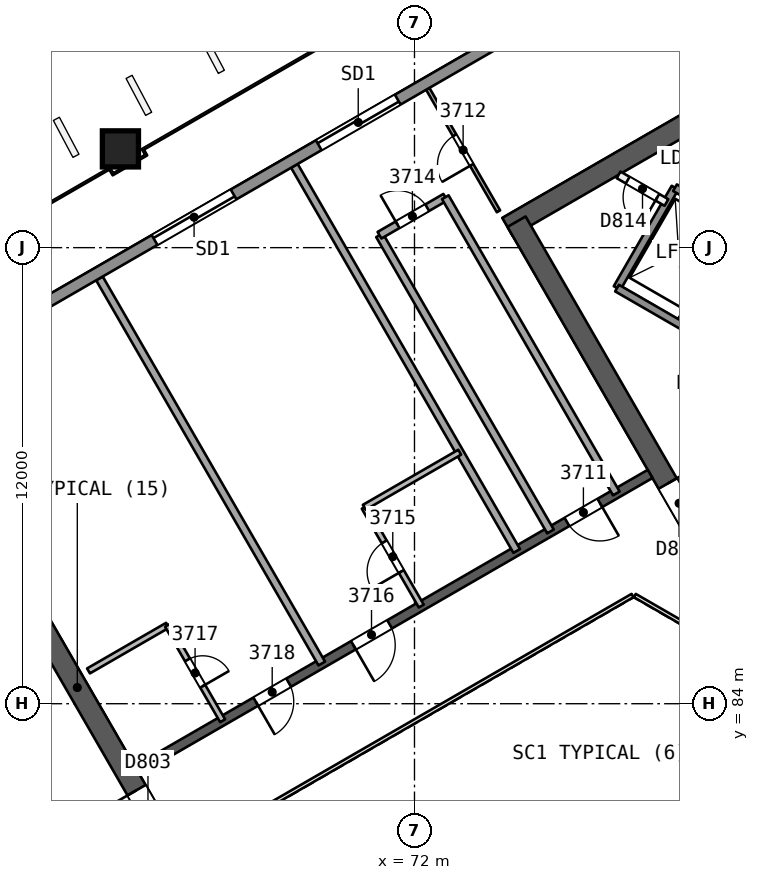
"""IFC4 building model, lengths in metres.
Left out: names, types, materials, properties, quantities, classifications, styles, units other than length and angle.
Written with IfcOpenShell. Run it as: python <this file> out.ifc"""

import sys

from ifc_helpers import new_model, si_unit, direction, frame, frame_2d, origin, origin_2d, place, context, subcontext, project, spatial, rectangle, extrude, element, fill, save


model = new_model("IFC4")
c1 = context("Model", 3, precision=1e-05, world=origin(), true_north=direction((0.0, 1.0)))
c2 = subcontext(c1, "Body", "Model", "MODEL_VIEW")
j1 = project(units=[si_unit("LENGTHUNIT", "METRE"), si_unit("PLANEANGLEUNIT", "RADIAN")], contexts=[c1])
p1 = place(None, origin())
s1 = spatial("IfcSite", under=j1, at=p1, CompositionType="ELEMENT")
p2 = place(p1, origin())
s2 = spatial("IfcBuilding", under=s1, at=p2, CompositionType="ELEMENT")
p3 = place(p2, frame((0.0, 0.0, 156.3)))
s3 = spatial("IfcBuildingStorey", under=s2, at=p3, CompositionType="ELEMENT", Elevation=156.3)
p4 = place(p3, frame((65.682, 80.0, 0.0), z_axis=(0.0, 0.0, 1.0), x_axis=(-0.500000202252, 0.866025287014, 0.0)))
e1 = element("IfcWall", 1, at=p4, inside=s3, PredefinedType="SHEAR", context=c2, shape_type="SweptSolid", body=[
    extrude(rectangle(XDim=10.221, YDim=0.55, at=frame_2d((5.111, 0.0))), origin(), (0.0, 0.0, 1.0), 3.7),
])
p5 = place(p4, frame((0.791, 0.0, 0.0)))
e2 = element("IfcOpeningElement", 2, at=p5, cuts=e1, PredefinedType="OPENING", context=c2, shape_type="SweptSolid", body=[
    extrude(rectangle(XDim=1.2, YDim=2.1, at=frame_2d((0.6, 1.05))), frame((0.0, 0.286, 0.0), z_axis=(0.0, -1.0, 0.0), x_axis=(1.0, 0.0, 0.0)), (0.0, 0.0, 1.0), 0.571),
])
p6 = place(p3, frame((86.723, 103.633, 0.0), z_axis=(0.0, 0.0, 1.0), x_axis=(-0.866023530946, -0.500003243837, 0.0)))
e3 = element("IfcWall", 3, at=p6, inside=s3, PredefinedType="SHEAR", context=c2, shape_type="SweptSolid", body=[
    extrude(rectangle(XDim=14.175, YDim=0.55, at=frame_2d((7.087, 0.0))), origin(), (0.0, 0.0, 1.0), 3.7),
])
p7 = place(p3, frame((74.686, 96.683, 0.0), z_axis=(0.0, 0.0, 1.0), x_axis=(0.499997818338, -0.866026663364, 0.0)))
e4 = element("IfcWall", 4, at=p7, inside=s3, PredefinedType="SHEAR", context=c2, shape_type="SweptSolid", body=[
    extrude(rectangle(XDim=10.105, YDim=0.55, at=frame_2d((5.052, 0.0))), origin(), (0.0, 0.0, 1.0), 3.7),
])
p8 = place(p7, frame((7.955, 0.0, 0.0)))
e5 = element("IfcOpeningElement", 5, at=p8, cuts=e4, PredefinedType="OPENING", context=c2, shape_type="SweptSolid", body=[
    extrude(rectangle(XDim=1.2, YDim=2.1, at=frame_2d((0.6, 1.05))), frame((0.0, 0.286, 0.0), z_axis=(0.0, -1.0, 0.0), x_axis=(1.0, 0.0, 0.0)), (0.0, 0.0, 1.0), 0.571),
])
p9 = place(p3, frame((78.2, 90.046, 0.0), z_axis=(0.0, 0.0, 1.0), x_axis=(-0.866026492143, -0.499998114903, 0.0)))
e6 = element("IfcWall", 6, at=p9, inside=s3, PredefinedType="SHEAR", context=c2, shape_type="SweptSolid", body=[
    extrude(rectangle(XDim=15.588, YDim=0.25, at=frame_2d((7.794, 0.0))), origin(), (0.0, 0.0, 1.0), 3.25),
])
p10 = place(p9, frame((1.527, 0.0, 0.0)))
e7 = element("IfcOpeningElement", 7, at=p10, cuts=e6, PredefinedType="OPENING", context=c2, shape_type="SweptSolid", body=[
    extrude(rectangle(XDim=1.0, YDim=2.1, at=frame_2d((0.5, 1.05))), frame((0.0, 0.135, 0.0), z_axis=(0.0, -1.0, 0.0), x_axis=(1.0, 0.0, 0.0)), (0.0, 0.0, 1.0), 0.271),
])
p11 = place(p9, frame((7.915, 0.0, 0.0)))
e8 = element("IfcOpeningElement", 8, at=p11, cuts=e6, PredefinedType="OPENING", context=c2, shape_type="SweptSolid", body=[
    extrude(rectangle(XDim=1.1, YDim=2.1, at=frame_2d((0.55, 1.05))), frame((0.0, 0.135, 0.0), z_axis=(0.0, -1.0, 0.0), x_axis=(1.0, 0.0, 0.0)), (0.0, 0.0, 1.0), 0.271),
])
p12 = place(p9, frame((10.982, 0.0, 0.0)))
e9 = element("IfcOpeningElement", 9, at=p12, cuts=e6, PredefinedType="OPENING", context=c2, shape_type="SweptSolid", body=[
    extrude(rectangle(XDim=1.0, YDim=2.1, at=frame_2d((0.5, 1.05))), frame((0.0, 0.135, 0.0), z_axis=(0.0, -1.0, 0.0), x_axis=(1.0, 0.0, 0.0)), (0.0, 0.0, 1.0), 0.271),
])
p13 = place(p3, frame((64.25, 98.62, 0.0), z_axis=(0.010093620709, -0.017482414954, 0.999796221231), x_axis=(-0.499897086036, 0.865849517735, 0.020187025824)))
e10 = element("IfcColumn", 10, at=p13, inside=s3, PredefinedType="COLUMN", context=c2, shape_type="SweptSolid", body=[
    extrude(rectangle(XDim=0.95, YDim=0.95, at=origin_2d()), origin(), (0.0, 0.0, 1.0), 3.701),
])
p14 = place(p3, frame((74.21, 96.956, 0.0), z_axis=(0.0, 0.0, 1.0), x_axis=(-0.499983621345, 0.866034859799, 0.0)))
e11 = element("IfcWall", 11, at=p14, inside=s3, PredefinedType="PARTITIONING", context=c2, shape_type="SweptSolid", body=[
    extrude(rectangle(XDim=3.722, YDim=0.1, at=frame_2d((1.861, 0.0))), origin(), (0.0, 0.0, 1.0), 3.25),
])
p15 = place(p14, frame((1.411, 0.0, 0.0)))
e12 = element("IfcOpeningElement", 12, at=p15, cuts=e11, PredefinedType="OPENING", context=c2, shape_type="SweptSolid", body=[
    extrude(rectangle(XDim=0.9, YDim=2.1, at=frame_2d((0.45, 1.05))), frame((0.0, 0.061, 0.0), z_axis=(0.0, -1.0, 0.0), x_axis=(1.0, 0.0, 0.0)), (0.0, 0.0, 1.0), 0.121),
])
p16 = place(p3, frame((75.579, 88.533, 0.0), z_axis=(0.0, 0.0, 1.0), x_axis=(-0.5000018851, 0.866024315419, 0.0)))
e13 = element("IfcWall", 13, at=p16, inside=s3, PredefinedType="PARTITIONING", context=c2, shape_type="SweptSolid", body=[
    extrude(rectangle(XDim=9.0, YDim=0.2, at=frame_2d((4.5, 0.0))), origin(), (0.0, 0.0, 1.0), 3.25),
])
p17 = place(p3, frame((71.079, 96.327, 0.0), z_axis=(0.0, 0.0, 1.0), x_axis=(0.866041268327, 0.499972520799, 0.0)))
e14 = element("IfcWall", 14, at=p17, inside=s3, PredefinedType="PARTITIONING", context=c2, shape_type="SweptSolid", body=[
    extrude(rectangle(XDim=2.0, YDim=0.2, at=frame_2d((1.0, 0.0))), origin(), (0.0, 0.0, 1.0), 3.25),
])
p18 = place(p17, frame((0.55, 0.0, 0.0)))
e15 = element("IfcOpeningElement", 15, at=p18, cuts=e14, PredefinedType="OPENING", context=c2, shape_type="SweptSolid", body=[
    extrude(rectangle(XDim=0.9, YDim=2.1, at=frame_2d((0.45, 1.05))), frame((0.0, 0.11, 0.0), z_axis=(0.0, -1.0, 0.0), x_axis=(1.0, 0.0, 0.0)), (0.0, 0.0, 1.0), 0.221),
])
p19 = place(p3, frame((72.811, 97.327, 0.0), z_axis=(0.0, 0.0, 1.0), x_axis=(0.5000018851, -0.866024315419, 0.0)))
e16 = element("IfcWall", 16, at=p19, inside=s3, PredefinedType="PARTITIONING", context=c2, shape_type="SweptSolid", body=[
    extrude(rectangle(XDim=9.0, YDim=0.2, at=frame_2d((4.5, 0.0))), origin(), (0.0, 0.0, 1.0), 3.25),
])
p20 = place(p3, frame((68.839, 98.153, 0.0), z_axis=(0.0, 0.0, 1.0), x_axis=(0.499998785317, -0.866026105081, 0.0)))
e17 = element("IfcWall", 17, at=p20, inside=s3, PredefinedType="PARTITIONING", context=c2, shape_type="SweptSolid", body=[
    extrude(rectangle(XDim=11.701, YDim=0.2, at=frame_2d((5.851, 0.0))), origin(), (0.0, 0.0, 1.0), 3.25),
])
p21 = place(p3, frame((72.178, 86.569, 0.0), z_axis=(0.0, 0.0, 1.0), x_axis=(-0.499990139034, 0.866031096941, 0.0)))
e18 = element("IfcWall", 18, at=p21, inside=s3, PredefinedType="PARTITIONING", context=c2, shape_type="SweptSolid", body=[
    extrude(rectangle(XDim=3.0, YDim=0.15, at=frame_2d((1.5, 0.0))), origin(), (0.0, 0.0, 1.0), 3.25),
])
p22 = place(p21, frame((1.05, 0.0, 0.0)))
e19 = element("IfcOpeningElement", 19, at=p22, cuts=e18, PredefinedType="OPENING", context=c2, shape_type="SweptSolid", body=[
    extrude(rectangle(XDim=0.9, YDim=2.1, at=frame_2d((0.45, 1.05))), frame((0.0, 0.085, 0.0), z_axis=(0.0, -1.0, 0.0), x_axis=(1.0, 0.0, 0.0)), (0.0, 0.0, 1.0), 0.171),
])
p23 = place(p3, frame((70.678, 89.167, 0.0), z_axis=(0.0, 0.0, 1.0), x_axis=(0.866032775405, 0.499987231761, 0.0)))
e20 = element("IfcWall", 20, at=p23, inside=s3, PredefinedType="PARTITIONING", context=c2, shape_type="SweptSolid", body=[
    extrude(rectangle(XDim=2.9, YDim=0.15, at=frame_2d((1.45, 0.0))), origin(), (0.0, 0.0, 1.0), 3.25),
])
p24 = place(p3, frame((63.709, 95.191, 0.0), z_axis=(0.0, 0.0, 1.0), x_axis=(0.499998785317, -0.866026105081, 0.0)))
e21 = element("IfcWall", 21, at=p24, inside=s3, PredefinedType="PARTITIONING", context=c2, shape_type="SweptSolid", body=[
    extrude(rectangle(XDim=11.701, YDim=0.2, at=frame_2d((5.851, 0.0))), origin(), (0.0, 0.0, 1.0), 3.25),
])
p25 = place(p3, frame((63.422, 84.863, 0.0), z_axis=(0.0, 0.0, 1.0), x_axis=(0.865994240961, 0.500053971709, 0.0)))
e22 = element("IfcWall", 22, at=p25, inside=s3, PredefinedType="PARTITIONING", context=c2, shape_type="SweptSolid", body=[
    extrude(rectangle(XDim=2.401, YDim=0.15, at=frame_2d((1.201, 0.0))), origin(), (0.0, 0.0, 1.0), 3.25),
])
p26 = place(p3, frame((65.502, 86.063, 0.0), z_axis=(0.0, 0.0, 1.0), x_axis=(0.499987231761, -0.866032775405, 0.0)))
e23 = element("IfcWall", 23, at=p26, inside=s3, PredefinedType="PARTITIONING", context=c2, shape_type="SweptSolid", body=[
    extrude(rectangle(XDim=2.9, YDim=0.15, at=frame_2d((1.45, 0.0))), origin(), (0.0, 0.0, 1.0), 3.25),
])
p27 = place(p26, frame((1.05, 0.0, 0.0)))
e24 = element("IfcOpeningElement", 24, at=p27, cuts=e23, PredefinedType="OPENING", context=c2, shape_type="SweptSolid", body=[
    extrude(rectangle(XDim=0.8, YDim=2.1, at=frame_2d((0.4, 1.05))), frame((0.0, 0.085, 0.0), z_axis=(0.0, -1.0, 0.0), x_axis=(1.0, 0.0, 0.0)), (0.0, 0.0, 1.0), 0.171),
])
p28 = place(p3, frame((41.928, 82.788, 0.0), z_axis=(0.0, 0.0, 1.0), x_axis=(0.866025629663, 0.499999608766, 0.0)))
e25 = element("IfcWall", 25, at=p28, inside=s3, PredefinedType="SOLIDWALL", context=c2, shape_type="SweptSolid", body=[
    extrude(rectangle(XDim=54.494, YDim=0.3, at=frame_2d((27.247, 0.0))), origin(), (0.0, 0.0, 1.0), 3.25),
])
p29 = place(p28, frame((26.826, 0.0, 0.0)))
e26 = element("IfcOpeningElement", 26, at=p29, cuts=e25, PredefinedType="OPENING", context=c2, shape_type="SweptSolid", body=[
    extrude(rectangle(XDim=2.4, YDim=2.4, at=frame_2d((1.2, 1.2))), frame((0.0, 0.161, 0.0), z_axis=(0.0, -1.0, 0.0), x_axis=(1.0, 0.0, 0.0)), (0.0, 0.0, 1.0), 0.321),
])
p30 = place(p28, frame((31.815, 0.0, 0.0)))
e27 = element("IfcOpeningElement", 27, at=p30, cuts=e25, PredefinedType="OPENING", context=c2, shape_type="SweptSolid", body=[
    extrude(rectangle(XDim=2.4, YDim=2.4, at=frame_2d((1.2, 1.2))), frame((0.0, 0.161, 0.0), z_axis=(0.0, -1.0, 0.0), x_axis=(1.0, 0.0, 0.0)), (0.0, 0.0, 1.0), 0.321),
])
p31 = place(p28, frame((42.339, 0.0, 0.0)))
e28 = element("IfcOpeningElement", 28, at=p31, cuts=e25, PredefinedType="OPENING", context=c2, shape_type="SweptSolid", body=[
    extrude(rectangle(XDim=2.4, YDim=2.4, at=frame_2d((1.2, 1.2))), frame((0.0, 0.161, 0.0), z_axis=(0.0, -1.0, 0.0), x_axis=(1.0, 0.0, 0.0)), (0.0, 0.0, 1.0), 0.321),
])
p32 = place(p28, frame((11.289, 0.0, 0.0)))
e29 = element("IfcOpeningElement", 29, at=p32, cuts=e25, PredefinedType="OPENING", context=c2, shape_type="SweptSolid", body=[
    extrude(rectangle(XDim=2.4, YDim=2.4, at=frame_2d((1.2, 1.2))), frame((0.0, 0.161, 0.0), z_axis=(0.0, -1.0, 0.0), x_axis=(1.0, 0.0, 0.0)), (0.0, 0.0, 1.0), 0.321),
])
for number, where, z_axis, x_axis in (
    (30, (78.976, 93.986, 0.0), (0.0, 0.0, 1.0), (0.5, 0.866, 0.0)),
    (31, (77.33, 94.936, 0.0), (0.0, 0.0, 1.0), (0.5, 0.866, 0.0)),
):
    element("IfcWall", number, at=place(p3, frame(where, z_axis=z_axis, x_axis=x_axis)), inside=s3, PredefinedType="SOLIDWALL", context=c2, shape_type="SweptSolid", body=[
        extrude(rectangle(XDim=3.05, YDim=0.2, at=frame_2d((1.525, 0.0))), origin(), (0.0, 0.0, 1.0), 3.25),
    ])
p33 = place(p3, frame((86.77, 89.486, 0.0), z_axis=(0.0, 0.0, 1.0), x_axis=(-0.86601811187, 0.500012629753, 0.0)))
e32 = element("IfcWall", 32, at=p33, inside=s3, PredefinedType="SOLIDWALL", context=c2, shape_type="SweptSolid", body=[
    extrude(rectangle(XDim=10.9, YDim=0.2, at=frame_2d((5.45, 0.0))), origin(), (0.0, 0.0, 1.0), 3.25),
])
p34 = place(p33, frame((0.575, 0.0, 0.0)))
e33 = element("IfcOpeningElement", 33, at=p34, cuts=e32, PredefinedType="OPENING", context=c2, shape_type="SweptSolid", body=[
    extrude(rectangle(XDim=1.1, YDim=2.1, at=frame_2d((0.55, 1.05))), frame((0.0, 0.11, 0.0), z_axis=(0.0, -1.0, 0.0), x_axis=(1.0, 0.0, 0.0)), (0.0, 0.0, 1.0), 0.221),
])
p35 = place(p33, frame((2.825, 0.0, 0.0)))
e34 = element("IfcOpeningElement", 34, at=p35, cuts=e32, PredefinedType="OPENING", context=c2, shape_type="SweptSolid", body=[
    extrude(rectangle(XDim=1.1, YDim=2.1, at=frame_2d((0.55, 1.05))), frame((0.0, 0.11, 0.0), z_axis=(0.0, -1.0, 0.0), x_axis=(1.0, 0.0, 0.0)), (0.0, 0.0, 1.0), 0.221),
])
p36 = place(p33, frame((5.075, 0.0, 0.0)))
e35 = element("IfcOpeningElement", 35, at=p36, cuts=e32, PredefinedType="OPENING", context=c2, shape_type="SweptSolid", body=[
    extrude(rectangle(XDim=1.1, YDim=2.1, at=frame_2d((0.55, 1.05))), frame((0.0, 0.11, 0.0), z_axis=(0.0, -1.0, 0.0), x_axis=(1.0, 0.0, 0.0)), (0.0, 0.0, 1.0), 0.221),
])
p37 = place(p33, frame((7.325, 0.0, 0.0)))
e36 = element("IfcOpeningElement", 36, at=p37, cuts=e32, PredefinedType="OPENING", context=c2, shape_type="SweptSolid", body=[
    extrude(rectangle(XDim=1.1, YDim=2.1, at=frame_2d((0.55, 1.05))), frame((0.0, 0.11, 0.0), z_axis=(0.0, -1.0, 0.0), x_axis=(1.0, 0.0, 0.0)), (0.0, 0.0, 1.0), 0.221),
])
p38 = place(p3, frame((78.63, 97.188, 0.0), z_axis=(0.0, 0.0, 1.0), x_axis=(-0.866003949776, 0.500037157592, 0.0)))
e37 = element("IfcWall", 37, at=p38, inside=s3, PredefinedType="PARTITIONING", context=c2, shape_type="SweptSolid", body=[
    extrude(rectangle(XDim=1.455, YDim=0.2, at=frame_2d((0.728, 0.0))), origin(), (0.0, 0.0, 1.0), 3.25),
])
p39 = place(p38, frame((0.278, 0.0, 0.0)))
e38 = element("IfcOpeningElement", 38, at=p39, cuts=e37, PredefinedType="OPENING", context=c2, shape_type="SweptSolid", body=[
    extrude(rectangle(XDim=0.9, YDim=2.1, at=frame_2d((0.45, 1.05))), frame((0.0, 0.11, 0.0), z_axis=(0.0, -1.0, 0.0), x_axis=(1.0, 0.0, 0.0)), (0.0, 0.0, 1.0), 0.221),
])
p40 = place(p3, frame((80.5, 96.627, 0.0), z_axis=(0.0, 0.0, 1.0), x_axis=(-0.86601224135, 0.500022797313, 0.0)))
e39 = element("IfcWall", 39, at=p40, inside=s3, PredefinedType="SOLIDWALL", context=c2, shape_type="SweptSolid", body=[
    extrude(rectangle(XDim=1.9, YDim=0.2, at=frame_2d((0.95, 0.0))), origin(), (0.0, 0.0, 1.0), 3.25),
])
p41 = place(p40, frame((0.4, 0.0, 0.0)))
e40 = element("IfcOpeningElement", 40, at=p41, cuts=e39, PredefinedType="OPENING", context=c2, shape_type="SweptSolid", body=[
    extrude(rectangle(XDim=1.1, YDim=2.1, at=frame_2d((0.55, 1.05))), frame((0.0, 0.11, 0.0), z_axis=(0.0, -1.0, 0.0), x_axis=(1.0, 0.0, 0.0)), (0.0, 0.0, 1.0), 0.221),
])
p42 = place(p3, frame((79.53, 85.846, 0.0), z_axis=(0.0, 0.0, 1.0), x_axis=(-0.866041268327, 0.499972520799, 0.0)))
e41 = element("IfcWall", 41, at=p42, inside=s3, PredefinedType="PARTITIONING", context=c2, shape_type="SweptSolid", body=[
    extrude(rectangle(XDim=2.0, YDim=0.1, at=frame_2d((1.0, 0.0))), origin(), (0.0, 0.0, 1.0), 3.25),
])
p43 = place(p3, frame((77.738, 86.846, 0.0), z_axis=(0.0, 0.0, 1.0), x_axis=(-0.866026658274, -0.499997827154, 0.0)))
e42 = element("IfcWall", 42, at=p43, inside=s3, PredefinedType="PARTITIONING", context=c2, shape_type="SweptSolid", body=[
    extrude(rectangle(XDim=11.588, YDim=0.1, at=frame_2d((5.794, 0.0))), origin(), (0.0, 0.0, 1.0), 3.25),
])
p44 = place(p10, origin())
e43 = element("IfcDoor", 43, at=p44, inside=s3, OperationType="SINGLE_SWING_LEFT", PredefinedType="NOTDEFINED", context=c2, shape_type="SweptSolid", body=[
    extrude(rectangle(XDim=1.0, YDim=2.1, at=frame_2d((0.5, 1.05))), frame((0.0, 0.025, 0.0), z_axis=(0.0, -1.0, 0.0), x_axis=(1.0, 0.0, 0.0)), (0.0, 0.0, 1.0), 0.05),
])
fill(e7, e43)
p45 = place(p15, origin())
e44 = element("IfcDoor", 44, at=p45, inside=s3, OperationType="SINGLE_SWING_LEFT", PredefinedType="NOTDEFINED", context=c2, shape_type="SweptSolid", body=[
    extrude(rectangle(XDim=0.9, YDim=2.1, at=frame_2d((0.45, 1.05))), frame((0.0, 0.025, 0.0), z_axis=(0.0, -1.0, 0.0), x_axis=(1.0, 0.0, 0.0)), (0.0, 0.0, 1.0), 0.05),
])
fill(e12, e44)
p46 = place(p18, origin())
e45 = element("IfcDoor", 45, at=p46, inside=s3, OperationType="SINGLE_SWING_LEFT", PredefinedType="NOTDEFINED", context=c2, shape_type="SweptSolid", body=[
    extrude(rectangle(XDim=0.9, YDim=2.1, at=frame_2d((0.45, 1.05))), frame((0.0, 0.025, 0.0), z_axis=(0.0, -1.0, 0.0), x_axis=(1.0, 0.0, 0.0)), (0.0, 0.0, 1.0), 0.05),
])
fill(e15, e45)
p47 = place(p22, origin())
e46 = element("IfcDoor", 46, at=p47, inside=s3, OperationType="SINGLE_SWING_LEFT", PredefinedType="NOTDEFINED", context=c2, shape_type="SweptSolid", body=[
    extrude(rectangle(XDim=0.9, YDim=2.1, at=frame_2d((0.45, 1.05))), frame((0.0, 0.025, 0.0), z_axis=(0.0, -1.0, 0.0), x_axis=(1.0, 0.0, 0.0)), (0.0, 0.0, 1.0), 0.05),
])
fill(e19, e46)
p48 = place(p11, origin())
e47 = element("IfcDoor", 47, at=p48, inside=s3, OperationType="SINGLE_SWING_RIGHT", PredefinedType="NOTDEFINED", context=c2, shape_type="SweptSolid", body=[
    extrude(rectangle(XDim=1.1, YDim=2.1, at=frame_2d((0.55, 1.05))), frame((0.0, 0.025, 0.0), z_axis=(0.0, -1.0, 0.0), x_axis=(1.0, 0.0, 0.0)), (0.0, 0.0, 1.0), 0.05),
])
fill(e8, e47)
p49 = place(p27, origin())
e48 = element("IfcDoor", 48, at=p49, inside=s3, OperationType="SINGLE_SWING_RIGHT", PredefinedType="NOTDEFINED", context=c2, shape_type="SweptSolid", body=[
    extrude(rectangle(XDim=0.8, YDim=2.1, at=frame_2d((0.4, 1.05))), frame((0.0, 0.025, 0.0), z_axis=(0.0, -1.0, 0.0), x_axis=(1.0, 0.0, 0.0)), (0.0, 0.0, 1.0), 0.05),
])
fill(e24, e48)
p50 = place(p12, origin())
e49 = element("IfcDoor", 49, at=p50, inside=s3, OperationType="SINGLE_SWING_RIGHT", PredefinedType="NOTDEFINED", context=c2, shape_type="SweptSolid", body=[
    extrude(rectangle(XDim=1.0, YDim=2.1, at=frame_2d((0.5, 1.05))), frame((0.0, 0.025, 0.0), z_axis=(0.0, -1.0, 0.0), x_axis=(1.0, 0.0, 0.0)), (0.0, 0.0, 1.0), 0.05),
])
fill(e9, e49)
p51 = place(p29, origin())
e50 = element("IfcDoor", 50, at=p51, inside=s3, OperationType="SLIDING_TO_LEFT", PredefinedType="NOTDEFINED", context=c2, shape_type="SweptSolid", body=[
    extrude(rectangle(XDim=2.4, YDim=2.4, at=frame_2d((1.2, 1.2))), frame((0.0, 0.025, 0.0), z_axis=(0.0, -1.0, 0.0), x_axis=(1.0, 0.0, 0.0)), (0.0, 0.0, 1.0), 0.05),
])
fill(e26, e50)
p52 = place(p30, origin())
e51 = element("IfcDoor", 51, at=p52, inside=s3, OperationType="SLIDING_TO_RIGHT", PredefinedType="NOTDEFINED", context=c2, shape_type="SweptSolid", body=[
    extrude(rectangle(XDim=2.4, YDim=2.4, at=frame_2d((1.2, 1.2))), frame((0.0, 0.025, 0.0), z_axis=(0.0, -1.0, 0.0), x_axis=(1.0, 0.0, 0.0)), (0.0, 0.0, 1.0), 0.05),
])
fill(e27, e51)
p53 = place(p5, origin())
e52 = element("IfcDoor", 52, at=p53, inside=s3, OperationType="SINGLE_SWING_RIGHT", PredefinedType="NOTDEFINED", context=c2, shape_type="SweptSolid", body=[
    extrude(rectangle(XDim=1.2, YDim=2.1, at=frame_2d((0.6, 1.05))), frame((0.0, 0.025, 0.0), z_axis=(0.0, -1.0, 0.0), x_axis=(1.0, 0.0, 0.0)), (0.0, 0.0, 1.0), 0.05),
])
fill(e2, e52)
p54 = place(p8, origin())
e53 = element("IfcDoor", 53, at=p54, inside=s3, OperationType="SINGLE_SWING_LEFT", PredefinedType="NOTDEFINED", context=c2, shape_type="SweptSolid", body=[
    extrude(rectangle(XDim=1.2, YDim=2.1, at=frame_2d((0.6, 1.05))), frame((0.0, 0.025, 0.0), z_axis=(0.0, -1.0, 0.0), x_axis=(1.0, 0.0, 0.0)), (0.0, 0.0, 1.0), 0.05),
])
fill(e5, e53)
p55 = place(p39, origin())
e54 = element("IfcDoor", 54, at=p55, inside=s3, OperationType="SINGLE_SWING_LEFT", PredefinedType="NOTDEFINED", context=c2, shape_type="SweptSolid", body=[
    extrude(rectangle(XDim=0.9, YDim=2.1, at=frame_2d((0.45, 1.05))), frame((0.0, 0.025, 0.0), z_axis=(0.0, -1.0, 0.0), x_axis=(1.0, 0.0, 0.0)), (0.0, 0.0, 1.0), 0.05),
])
fill(e38, e54)
save(model, sys.argv[1])
